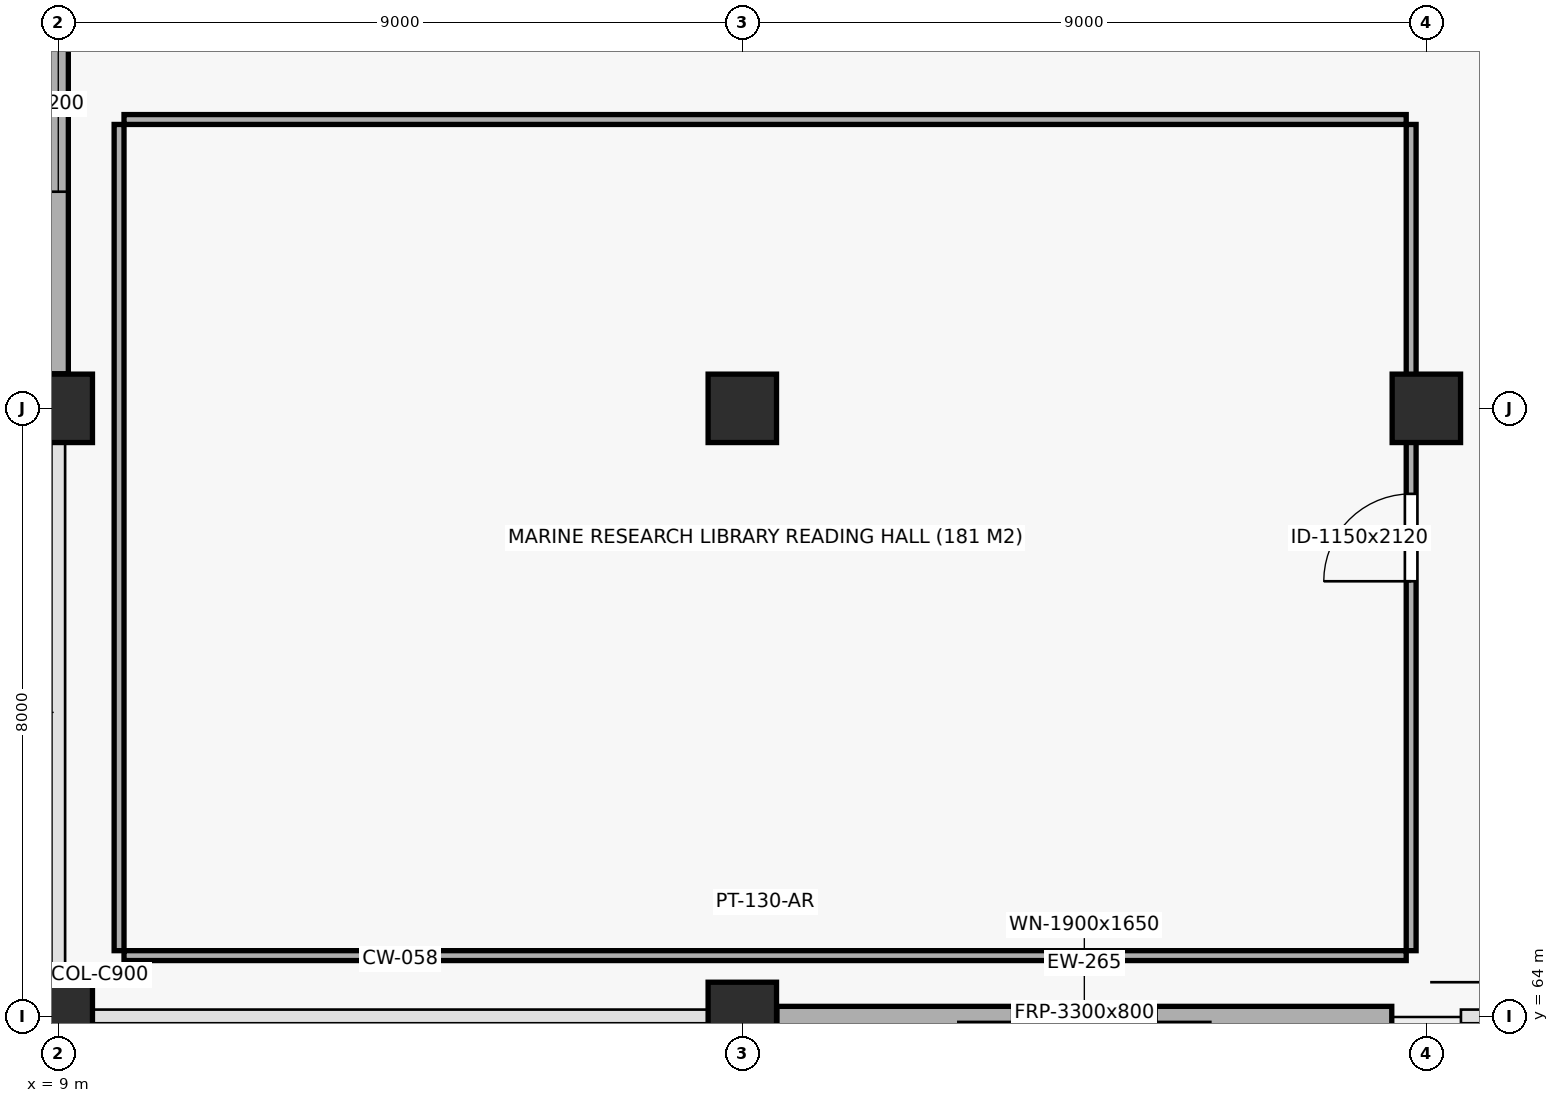
"""IFC4 building model, lengths in metres.
Left out: names, types, materials, properties, quantities, classifications, styles, units other than length and angle.
Written with IfcOpenShell. Run it as: python <this file> out.ifc"""

import sys

from ifc_helpers import new_model, si_unit, direction, frame, frame_2d, origin, origin_2d, place, context, subcontext, project, spatial, rectangle, extrude, element, fill, save


model = new_model("IFC4")
c1 = context("Model", 3, precision=1e-05, world=origin(), true_north=direction((0.0, 1.0)))
c2 = subcontext(c1, "Body", "Model", "MODEL_VIEW")
j1 = project(units=[si_unit("LENGTHUNIT", "METRE"), si_unit("PLANEANGLEUNIT", "RADIAN")], contexts=[c1])
p1 = place(None, origin())
s1 = spatial("IfcSite", under=j1, at=p1, CompositionType="ELEMENT")
p2 = place(p1, origin())
s2 = spatial("IfcBuilding", under=s1, at=p2, CompositionType="ELEMENT")
p3 = place(p2, frame((0.0, 0.0, 18.0)))
s3 = spatial("IfcBuildingStorey", under=s2, at=p3, CompositionType="ELEMENT", Elevation=18.0)
for number, where, z_axis, x_axis in (
    (1, (9.0, 64.0, 0.0), (0.0, 0.0, 1.0), (1.0, 0.0, 0.0)),
    (2, (9.0, 72.0, 0.0), (0.0, 0.0, 1.0), (1.0, 0.0, 0.0)),
    (3, (18.0, 64.0, 0.0), (0.0, 0.0, 1.0), (1.0, 0.0, 0.0)),
    (4, (18.0, 72.0, 0.0), (0.0, 0.0, 1.0), (1.0, 0.0, 0.0)),
    (5, (27.0, 72.0, 0.0), (0.0, 0.0, 1.0), (1.0, 0.0, 0.0)),
):
    element("IfcColumn", number, at=place(p3, frame(where, z_axis=z_axis, x_axis=x_axis)), inside=s3, PredefinedType="COLUMN", context=c2, shape_type="SweptSolid", body=[
        extrude(rectangle(XDim=0.9, YDim=0.9, at=origin_2d()), origin(), (0.0, 0.0, 1.0), 3.9),
    ])
p4 = place(p3, frame((18.455, 64.0, 0.0), z_axis=(0.0, 0.0, 1.0), x_axis=(1.0, 0.0, 0.0)))
e6 = element("IfcWall", 6, at=p4, inside=s3, PredefinedType="STANDARD", context=c2, shape_type="SweptSolid", body=[
    extrude(rectangle(XDim=8.09, YDim=0.265, at=frame_2d((4.045, 0.0))), origin(), (0.0, 0.0, 1.0), 2.98),
])
p5 = place(p4, frame((3.095, 0.0, 0.85)))
e7 = element("IfcOpeningElement", 7, at=p5, cuts=e6, PredefinedType="OPENING", context=c2, shape_type="SweptSolid", body=[
    extrude(rectangle(XDim=1.9, YDim=1.65, at=frame_2d((0.95, 0.825))), frame((0.0, 0.145, 0.0), z_axis=(0.0, -1.0, 0.0), x_axis=(1.0, 0.0, 0.0)), (0.0, 0.0, 1.0), 0.289),
])
p6 = place(p3, frame((9.0, 72.455, 0.0), z_axis=(0.0, 0.0, 1.0), x_axis=(0.0, 1.0, 0.0)))
e8 = element("IfcWall", 8, at=p6, inside=s3, PredefinedType="STANDARD", context=c2, shape_type="SweptSolid", body=[
    extrude(rectangle(XDim=7.09, YDim=0.265, at=frame_2d((3.545, 0.0))), origin(), (0.0, 0.0, 1.0), 2.98),
])
p7 = place(p6, frame((2.395, 0.0, 0.85)))
e9 = element("IfcOpeningElement", 9, at=p7, cuts=e8, PredefinedType="OPENING", context=c2, shape_type="SweptSolid", body=[
    extrude(rectangle(XDim=2.3, YDim=1.2, at=frame_2d((1.15, 0.6))), frame((0.0, 0.145, 0.0), z_axis=(0.0, -1.0, 0.0), x_axis=(1.0, 0.0, 0.0)), (0.0, 0.0, 1.0), 0.289),
])
for number, where, z_axis, x_axis in (
    (10, (9.865, 64.8, 0.0), (0.0, 0.0, 1.0), (1.0, 0.0, 0.0)),
    (11, (9.865, 75.8, 0.0), (0.0, 0.0, 1.0), (1.0, 0.0, 0.0)),
):
    element("IfcWall", number, at=place(p3, frame(where, z_axis=z_axis, x_axis=x_axis)), inside=s3, PredefinedType="PARTITIONING", context=c2, shape_type="SweptSolid", body=[
        extrude(rectangle(XDim=16.87, YDim=0.13, at=frame_2d((8.435, 0.0))), origin(), (0.0, 0.0, 1.0), 3.65),
    ])
p8 = place(p3, frame((9.8, 64.865, 0.0), z_axis=(0.0, 0.0, 1.0), x_axis=(0.0, 1.0, 0.0)))
e12 = element("IfcWall", 12, at=p8, inside=s3, PredefinedType="PARTITIONING", context=c2, shape_type="SweptSolid", body=[
    extrude(rectangle(XDim=10.87, YDim=0.13, at=frame_2d((5.435, 0.0))), origin(), (0.0, 0.0, 1.0), 3.65),
])
p9 = place(p3, frame((26.8, 64.865, 0.0), z_axis=(0.0, 0.0, 1.0), x_axis=(0.0, 1.0, 0.0)))
e13 = element("IfcWall", 13, at=p9, inside=s3, PredefinedType="PARTITIONING", context=c2, shape_type="SweptSolid", body=[
    extrude(rectangle(XDim=10.87, YDim=0.13, at=frame_2d((5.435, 0.0))), origin(), (0.0, 0.0, 1.0), 2.85),
])
p10 = place(p9, frame((4.86, 0.0, 0.0)))
e14 = element("IfcOpeningElement", 14, at=p10, cuts=e13, PredefinedType="OPENING", context=c2, shape_type="SweptSolid", body=[
    extrude(rectangle(XDim=1.15, YDim=2.12, at=frame_2d((0.575, 1.06))), frame((0.0, 0.077, 0.0), z_axis=(0.0, -1.0, 0.0), x_axis=(1.0, 0.0, 0.0)), (0.0, 0.0, 1.0), 0.154),
])
p11 = place(p5, origin())
e15 = element("IfcWindow", 15, at=p11, inside=s3, PartitioningType="SINGLE_PANEL", PredefinedType="WINDOW", context=c2, shape_type="SweptSolid", body=[
    extrude(rectangle(XDim=1.9, YDim=1.65, at=frame_2d((0.95, 0.825))), frame((0.0, 0.03, 0.0), z_axis=(0.0, -1.0, 0.0), x_axis=(1.0, 0.0, 0.0)), (0.0, 0.0, 1.0), 0.06),
])
fill(e7, e15)
p12 = place(p7, origin())
e16 = element("IfcWindow", 16, at=p12, inside=s3, PartitioningType="SINGLE_PANEL", PredefinedType="WINDOW", context=c2, shape_type="SweptSolid", body=[
    extrude(rectangle(XDim=2.3, YDim=1.2, at=frame_2d((1.15, 0.6))), frame((0.0, 0.03, 0.0), z_axis=(0.0, -1.0, 0.0), x_axis=(1.0, 0.0, 0.0)), (0.0, 0.0, 1.0), 0.06),
])
fill(e9, e16)
p13 = place(p10, origin())
e17 = element("IfcDoor", 17, at=p13, inside=s3, OperationType="SINGLE_SWING_LEFT", PredefinedType="DOOR", context=c2, shape_type="SweptSolid", body=[
    extrude(rectangle(XDim=1.15, YDim=2.12, at=frame_2d((0.575, 1.06))), frame((0.0, 0.025, 0.0), z_axis=(0.0, -1.0, 0.0), x_axis=(1.0, 0.0, 0.0)), (0.0, 0.0, 1.0), 0.05),
])
fill(e14, e17)
save(model, sys.argv[1])
